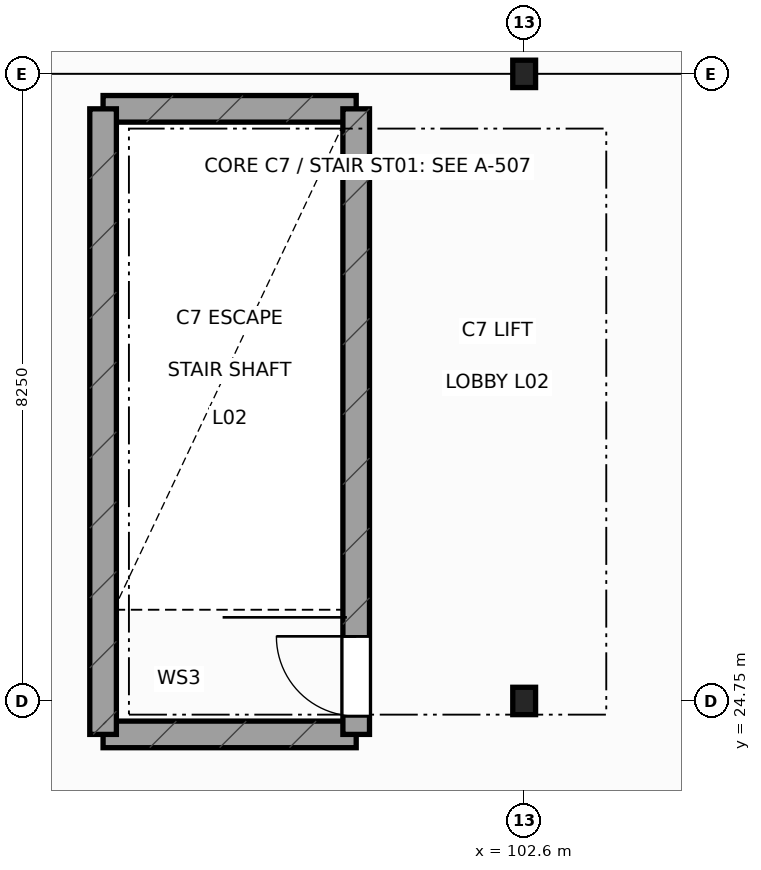
"""IFC4 building model, lengths in metres.
Left out: names, types, materials, properties, quantities, classifications, styles, units other than length and angle.
Written with IfcOpenShell. Run it as: python <this file> out.ifc"""

import sys

from ifc_helpers import new_model, si_unit, direction, frame, frame_2d, origin, origin_2d, place, context, subcontext, project, spatial, rectangle, i_section, extrude, element, fill, save


model = new_model("IFC4")
c1 = context("Model", 3, precision=1e-05, world=origin(), true_north=direction((0.0, 1.0)))
c2 = subcontext(c1, "Body", "Model", "MODEL_VIEW")
j1 = project(units=[si_unit("LENGTHUNIT", "METRE"), si_unit("PLANEANGLEUNIT", "RADIAN")], contexts=[c1])
p1 = place(None, origin())
s1 = spatial("IfcSite", under=j1, at=p1, CompositionType="ELEMENT")
p2 = place(p1, origin())
s2 = spatial("IfcBuilding", under=s1, at=p2, CompositionType="ELEMENT")
p3 = place(p2, frame((0.0, 0.0, 11.4)))
s3 = spatial("IfcBuildingStorey", under=s2, at=p3, CompositionType="ELEMENT", Elevation=11.4)
for number, where, z_axis, x_axis in (
    (1, (102.6, 24.75, 0.0), (0.0, 0.0, 1.0), (1.0, 0.0, 0.0)),
    (2, (102.6, 33.0, 0.0), (0.0, 0.0, 1.0), (1.0, 0.0, 0.0)),
):
    element("IfcColumn", number, at=place(p3, frame(where, z_axis=z_axis, x_axis=x_axis)), inside=s3, PredefinedType="COLUMN", context=c2, shape_type="SweptSolid", body=[
        extrude(i_section(OverallWidth=0.3, OverallDepth=0.36, WebThickness=0.012, FlangeThickness=0.022, at=origin_2d()), origin(), (0.0, 0.0, 1.0), 5.4),
    ])
for number, where, z_axis, x_axis in (
    (3, (97.06, 24.31, 0.0), (0.0, 0.0, 1.0), (1.0, 0.0, 0.0)),
    (4, (97.06, 32.54, 0.0), (0.0, 0.0, 1.0), (1.0, 0.0, 0.0)),
):
    element("IfcWall", number, at=place(p3, frame(where, z_axis=z_axis, x_axis=x_axis)), inside=s3, PredefinedType="SHEAR", context=c2, shape_type="SweptSolid", body=[
        extrude(rectangle(XDim=3.33, YDim=0.35, at=frame_2d((1.665, 0.0))), origin(), (0.0, 0.0, 1.0), 5.12),
    ])
p4 = place(p3, frame((97.06, 24.31, 0.0), z_axis=(0.0, 0.0, 1.0), x_axis=(0.0, 1.0, 0.0)))
e5 = element("IfcWall", 5, at=p4, inside=s3, PredefinedType="SHEAR", context=c2, shape_type="SweptSolid", body=[
    extrude(rectangle(XDim=8.23, YDim=0.35, at=frame_2d((4.115, 0.0))), origin(), (0.0, 0.0, 1.0), 5.12),
])
p5 = place(p3, frame((100.39, 24.31, 0.0), z_axis=(0.0, 0.0, 1.0), x_axis=(0.0, 1.0, 0.0)))
e6 = element("IfcWall", 6, at=p5, inside=s3, PredefinedType="SHEAR", context=c2, shape_type="SweptSolid", body=[
    extrude(rectangle(XDim=8.23, YDim=0.35, at=frame_2d((4.115, 0.0))), origin(), (0.0, 0.0, 1.0), 5.12),
])
p6 = place(p5, frame((0.24, 0.0, 0.0)))
e7 = element("IfcOpeningElement", 7, at=p6, cuts=e6, PredefinedType="OPENING", context=c2, shape_type="SweptSolid", body=[
    extrude(rectangle(XDim=1.05, YDim=2.18, at=frame_2d((0.525, 1.09))), frame((0.0, 0.185, 0.0), z_axis=(0.0, -1.0, 0.0), x_axis=(1.0, 0.0, 0.0)), (0.0, 0.0, 1.0), 0.37),
])
p7 = place(p6, origin())
e8 = element("IfcDoor", 8, at=p7, inside=s3, OperationType="SINGLE_SWING_RIGHT", PredefinedType="DOOR", context=c2, shape_type="SweptSolid", body=[
    extrude(rectangle(XDim=1.05, YDim=2.18, at=frame_2d((0.525, 1.09))), frame((0.0, 0.025, 0.0), z_axis=(0.0, -1.0, 0.0), x_axis=(1.0, 0.0, 0.0)), (0.0, 0.0, 1.0), 0.05),
])
fill(e7, e8)
save(model, sys.argv[1])
